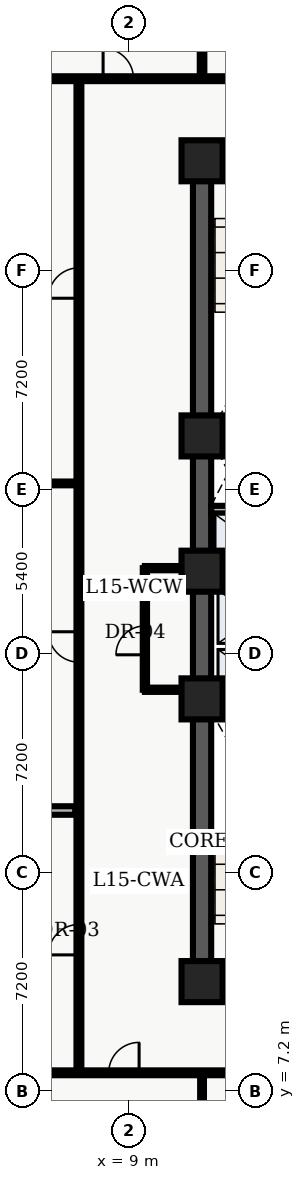
"""IFC4 building model, lengths in metres.
Left out: names, types, materials, properties, quantities, classifications, styles, units other than length and angle.
Written with IfcOpenShell. Run it as: python <this file> out.ifc"""

import sys

from ifc_helpers import new_model, entity, si_unit, converted_unit, direction, frame, origin_with_axes, origin_2d_with_axis, place, context, subcontext, project, spatial, polyline, rectangle, outline, extrude, element, fill, save


model = new_model("IFC4")
c1 = context("Model", 3, precision=1e-05, world=origin_with_axes(), true_north=direction((0.0, 1.0)))
c2 = subcontext(c1, "Body", "Model", "MODEL_VIEW")
j1 = project(units=[si_unit("LENGTHUNIT", "METRE"), converted_unit("PLANEANGLEUNIT", "DEGREE", entity("IfcPlaneAngleMeasure", 0.017), si_unit("PLANEANGLEUNIT", "RADIAN"), dimensions=[0, 0, 0, 0, 0, 0, 0])], contexts=[c1])
p1 = place(None, origin_with_axes())
s1 = spatial("IfcSite", under=j1, at=p1, CompositionType="ELEMENT")
p2 = place(p1, origin_with_axes())
s2 = spatial("IfcBuilding", under=s1, at=p2, CompositionType="ELEMENT")
p3 = place(p2, frame((0.0, 0.0, 63.9), z_axis=(0.0, 0.0, 1.0), x_axis=(1.0, 0.0, 0.0)))
s3 = spatial("IfcBuildingStorey", under=s2, at=p3, CompositionType="ELEMENT", Elevation=63.9)
p4 = place(p3, frame((11.4, 10.8, 0.0), z_axis=(0.0, 0.0, 1.0), x_axis=(0.0, 1.0, 0.0)))
e1 = element("IfcWall", 1, at=p4, inside=s3, PredefinedType="SHEAR", context=c2, shape_type="SweptSolid", body=[
    extrude(outline(polyline([(0.0, -0.3), (27.0, -0.3), (27.0, 0.3), (0.0, 0.3), (0.0, -0.3)])), origin_with_axes(), (0.0, 0.0, 1.0), 3.66),
])
p5 = place(p3, frame((11.4, 10.8, 0.0), z_axis=(0.0, 0.0, 1.0), x_axis=(1.0, 0.0, 0.0)))
e2 = element("IfcWall", 2, at=p5, inside=s3, PredefinedType="SHEAR", context=c2, shape_type="SweptSolid", body=[
    extrude(outline(polyline([(0.0, -0.3), (7.2, -0.3), (7.2, 0.3), (0.0, 0.3), (0.0, -0.3)])), origin_with_axes(), (0.0, 0.0, 1.0), 3.66),
])
p6 = place(p5, frame((2.625, 0.0, 0.0), z_axis=(0.0, 0.0, 1.0), x_axis=(1.0, 0.0, 0.0)))
e3 = element("IfcOpeningElement", 3, at=p6, cuts=e2, PredefinedType="OPENING", context=c2, shape_type="SweptSolid", body=[
    extrude(rectangle(XDim=1.05, YDim=0.62, at=origin_2d_with_axis()), origin_with_axes(), (0.0, 0.0, 1.0), 2.15),
])
p7 = place(p3, frame((11.4, 37.8, 0.0), z_axis=(0.0, 0.0, 1.0), x_axis=(1.0, 0.0, 0.0)))
e4 = element("IfcWall", 4, at=p7, inside=s3, PredefinedType="SHEAR", context=c2, shape_type="SweptSolid", body=[
    extrude(outline(polyline([(0.0, -0.3), (7.2, -0.3), (7.2, 0.3), (0.0, 0.3), (0.0, -0.3)])), origin_with_axes(), (0.0, 0.0, 1.0), 3.66),
])
p8 = place(p7, frame((2.625, 0.0, 0.0), z_axis=(0.0, 0.0, 1.0), x_axis=(1.0, 0.0, 0.0)))
e5 = element("IfcOpeningElement", 5, at=p8, cuts=e4, PredefinedType="OPENING", context=c2, shape_type="SweptSolid", body=[
    extrude(rectangle(XDim=1.05, YDim=0.62, at=origin_2d_with_axis()), origin_with_axes(), (0.0, 0.0, 1.0), 2.15),
])
for number, where, z_axis, x_axis in (
    (6, (11.7, 19.825, 0.0), (0.0, 0.0, 1.0), (1.0, 0.0, 0.0)),
    (7, (11.7, 28.775, 0.0), (0.0, 0.0, 1.0), (1.0, 0.0, 0.0)),
):
    element("IfcWall", number, at=place(p3, frame(where, z_axis=z_axis, x_axis=x_axis)), inside=s3, PredefinedType="SHEAR", context=c2, shape_type="SweptSolid", body=[
        extrude(outline(polyline([(0.0, -0.125), (6.6, -0.125), (6.6, 0.125), (0.0, 0.125), (0.0, -0.125)])), origin_with_axes(), (0.0, 0.0, 1.0), 3.66),
    ])
p9 = place(p3, frame((11.7, 24.1, 0.0), z_axis=(0.0, 0.0, 1.0), x_axis=(1.0, 0.0, 0.0)))
e8 = element("IfcWall", 8, at=p9, inside=s3, PredefinedType="SOLIDWALL", context=c2, shape_type="SweptSolid", body=[
    extrude(outline(polyline([(0.0, -0.125), (6.6, -0.125), (6.6, 0.125), (0.0, 0.125), (0.0, -0.125)])), origin_with_axes(), (0.0, 0.0, 1.0), 2.7),
])
p10 = place(p9, frame((3.75, 0.0, 0.0), z_axis=(0.0, 0.0, 1.0), x_axis=(1.0, 0.0, 0.0)))
e9 = element("IfcOpeningElement", 9, at=p10, cuts=e8, PredefinedType="OPENING", context=c2, shape_type="SweptSolid", body=[
    extrude(rectangle(XDim=0.9, YDim=0.27, at=origin_2d_with_axis()), origin_with_axes(), (0.0, 0.0, 1.0), 2.15),
])
p11 = place(p3, frame((11.7, 26.325, 0.0), z_axis=(0.0, 0.0, 1.0), x_axis=(1.0, 0.0, 0.0)))
e10 = element("IfcWall", 10, at=p11, inside=s3, PredefinedType="SOLIDWALL", context=c2, shape_type="SweptSolid", body=[
    extrude(outline(polyline([(0.0, -0.125), (6.6, -0.125), (6.6, 0.125), (0.0, 0.125), (0.0, -0.125)])), origin_with_axes(), (0.0, 0.0, 1.0), 2.7),
])
p12 = place(p11, frame((3.5, 0.0, 0.0), z_axis=(0.0, 0.0, 1.0), x_axis=(1.0, 0.0, 0.0)))
e11 = element("IfcOpeningElement", 11, at=p12, cuts=e10, PredefinedType="OPENING", context=c2, shape_type="SweptSolid", body=[
    extrude(rectangle(XDim=0.9, YDim=0.27, at=origin_2d_with_axis()), origin_with_axes(), (0.0, 0.0, 1.0), 2.15),
])
for number, where, z_axis, x_axis in (
    (12, (11.4, 10.8, 0.0), (0.0, 0.0, 1.0), (1.0, 0.0, 0.0)),
    (13, (11.4, 20.1, 0.0), (0.0, 0.0, 1.0), (1.0, 0.0, 0.0)),
    (14, (11.4, 24.3, 0.0), (0.0, 0.0, 1.0), (1.0, 0.0, 0.0)),
    (15, (11.4, 28.75, 0.0), (0.0, 0.0, 1.0), (1.0, 0.0, 0.0)),
    (16, (11.4, 37.8, 0.0), (0.0, 0.0, 1.0), (1.0, 0.0, 0.0)),
):
    element("IfcColumn", number, at=place(p3, frame(where, z_axis=z_axis, x_axis=x_axis)), inside=s3, PredefinedType="COLUMN", context=c2, shape_type="SweptSolid", body=[
        extrude(rectangle(XDim=1.35, YDim=1.35, at=origin_2d_with_axis()), origin_with_axes(), (0.0, 0.0, 1.0), 3.9),
    ])
p13 = place(p3, frame((9.52, 20.4, 0.0), z_axis=(0.0, 0.0, 1.0), x_axis=(0.0, 1.0, 0.0)))
e17 = element("IfcWall", 17, at=p13, inside=s3, PredefinedType="PARTITIONING", context=c2, shape_type="SweptSolid", body=[
    extrude(outline(polyline([(0.0, -0.07), (4.0, -0.07), (4.0, 0.07), (0.0, 0.07), (0.0, -0.07)])), origin_with_axes(), (0.0, 0.0, 1.0), 2.7),
])
p14 = place(p13, frame((1.625, 0.0, 0.0), z_axis=(0.0, 0.0, 1.0), x_axis=(1.0, 0.0, 0.0)))
e18 = element("IfcOpeningElement", 18, at=p14, cuts=e17, PredefinedType="OPENING", context=c2, shape_type="SweptSolid", body=[
    extrude(rectangle(XDim=0.95, YDim=0.16, at=origin_2d_with_axis()), origin_with_axes(), (0.0, 0.0, 1.0), 2.15),
])
for number, where, z_axis, x_axis in (
    (19, (9.52, 20.4, 0.0), (0.0, 0.0, 1.0), (1.0, 0.0, 0.0)),
    (20, (9.52, 24.4, 0.0), (0.0, 0.0, 1.0), (1.0, 0.0, 0.0)),
):
    element("IfcWall", number, at=place(p3, frame(where, z_axis=z_axis, x_axis=x_axis)), inside=s3, PredefinedType="PARTITIONING", context=c2, shape_type="SweptSolid", body=[
        extrude(outline(polyline([(0.0, -0.07), (1.58, -0.07), (1.58, 0.07), (0.0, 0.07), (0.0, -0.07)])), origin_with_axes(), (0.0, 0.0, 1.0), 2.7),
    ])
p15 = place(p3, frame((2.6, 7.8, 0.0), z_axis=(0.0, 0.0, 1.0), x_axis=(1.0, 0.0, 0.0)))
e21 = element("IfcWall", 21, at=p15, inside=s3, PredefinedType="PARTITIONING", context=c2, shape_type="SweptSolid", body=[
    extrude(outline(polyline([(0.0, -0.08), (18.55, -0.08), (18.55, 0.08), (0.0, 0.08), (0.0, -0.08)])), origin_with_axes(), (0.0, 0.0, 1.0), 2.7),
])
p16 = place(p15, frame((1.825, 0.0, 0.0), z_axis=(0.0, 0.0, 1.0), x_axis=(1.0, 0.0, 0.0)))
e22 = element("IfcOpeningElement", 22, at=p16, cuts=e21, PredefinedType="OPENING", context=c2, shape_type="SweptSolid", body=[
    extrude(rectangle(XDim=1.0, YDim=0.18, at=origin_2d_with_axis()), origin_with_axes(), (0.0, 0.0, 1.0), 2.15),
])
p17 = place(p15, frame((6.229, 0.0, 0.0), z_axis=(0.0, 0.0, 1.0), x_axis=(1.0, 0.0, 0.0)))
e23 = element("IfcOpeningElement", 23, at=p17, cuts=e21, PredefinedType="OPENING", context=c2, shape_type="SweptSolid", body=[
    extrude(rectangle(XDim=1.0, YDim=0.18, at=origin_2d_with_axis()), origin_with_axes(), (0.0, 0.0, 1.0), 2.15),
])
p18 = place(p15, frame((10.706, 0.0, 0.0), z_axis=(0.0, 0.0, 1.0), x_axis=(1.0, 0.0, 0.0)))
e24 = element("IfcOpeningElement", 24, at=p18, cuts=e21, PredefinedType="OPENING", context=c2, shape_type="SweptSolid", body=[
    extrude(rectangle(XDim=1.0, YDim=0.18, at=origin_2d_with_axis()), origin_with_axes(), (0.0, 0.0, 1.0), 2.15),
])
p19 = place(p15, frame((15.556, 0.0, 0.0), z_axis=(0.0, 0.0, 1.0), x_axis=(1.0, 0.0, 0.0)))
e25 = element("IfcOpeningElement", 25, at=p19, cuts=e21, PredefinedType="OPENING", context=c2, shape_type="SweptSolid", body=[
    extrude(rectangle(XDim=1.0, YDim=0.18, at=origin_2d_with_axis()), origin_with_axes(), (0.0, 0.0, 1.0), 2.15),
])
p20 = place(p3, frame((2.6, 40.5, 0.0), z_axis=(0.0, 0.0, 1.0), x_axis=(1.0, 0.0, 0.0)))
e26 = element("IfcWall", 26, at=p20, inside=s3, PredefinedType="PARTITIONING", context=c2, shape_type="SweptSolid", body=[
    extrude(outline(polyline([(0.0, -0.08), (18.65, -0.08), (18.65, 0.08), (0.0, 0.08), (0.0, -0.08)])), origin_with_axes(), (0.0, 0.0, 1.0), 2.7),
])
p21 = place(p20, frame((6.045, 0.0, 0.0), z_axis=(0.0, 0.0, 1.0), x_axis=(1.0, 0.0, 0.0)))
e27 = element("IfcOpeningElement", 27, at=p21, cuts=e26, PredefinedType="OPENING", context=c2, shape_type="SweptSolid", body=[
    extrude(rectangle(XDim=1.0, YDim=0.18, at=origin_2d_with_axis()), origin_with_axes(), (0.0, 0.0, 1.0), 2.15),
])
p22 = place(p20, frame((12.61, 0.0, 0.0), z_axis=(0.0, 0.0, 1.0), x_axis=(1.0, 0.0, 0.0)))
e28 = element("IfcOpeningElement", 28, at=p22, cuts=e26, PredefinedType="OPENING", context=c2, shape_type="SweptSolid", body=[
    extrude(rectangle(XDim=1.2, YDim=0.18, at=origin_2d_with_axis()), origin_with_axes(), (0.0, 0.0, 1.0), 2.2),
])
p23 = place(p3, frame((7.35, 7.8, 0.0), z_axis=(0.0, 0.0, 1.0), x_axis=(0.0, 1.0, 0.0)))
e29 = element("IfcWall", 29, at=p23, inside=s3, PredefinedType="PARTITIONING", context=c2, shape_type="SweptSolid", body=[
    extrude(outline(polyline([(0.0, -0.08), (32.7, -0.08), (32.7, 0.08), (0.0, 0.08), (0.0, -0.08)])), origin_with_axes(), (0.0, 0.0, 1.0), 2.7),
])
p24 = place(p23, frame((4.379, 0.0, 0.0), z_axis=(0.0, 0.0, 1.0), x_axis=(1.0, 0.0, 0.0)))
e30 = element("IfcOpeningElement", 30, at=p24, cuts=e29, PredefinedType="OPENING", context=c2, shape_type="SweptSolid", body=[
    extrude(rectangle(XDim=1.0, YDim=0.18, at=origin_2d_with_axis()), origin_with_axes(), (0.0, 0.0, 1.0), 2.15),
])
p25 = place(p23, frame((14.008, 0.0, 0.0), z_axis=(0.0, 0.0, 1.0), x_axis=(1.0, 0.0, 0.0)))
e31 = element("IfcOpeningElement", 31, at=p25, cuts=e29, PredefinedType="OPENING", context=c2, shape_type="SweptSolid", body=[
    extrude(rectangle(XDim=1.0, YDim=0.18, at=origin_2d_with_axis()), origin_with_axes(), (0.0, 0.0, 1.0), 2.15),
])
p26 = place(p23, frame((25.979, 0.0, 0.0), z_axis=(0.0, 0.0, 1.0), x_axis=(1.0, 0.0, 0.0)))
e32 = element("IfcOpeningElement", 32, at=p26, cuts=e29, PredefinedType="OPENING", context=c2, shape_type="SweptSolid", body=[
    extrude(rectangle(XDim=1.0, YDim=0.18, at=origin_2d_with_axis()), origin_with_axes(), (0.0, 0.0, 1.0), 2.15),
])
p27 = place(p3, frame((0.375, 16.428, 0.0), z_axis=(0.0, 0.0, 1.0), x_axis=(1.0, 0.0, 0.0)))
e33 = element("IfcWall", 33, at=p27, inside=s3, PredefinedType="PARTITIONING", context=c2, shape_type="SweptSolid", body=[
    extrude(outline(polyline([(0.0, -0.14), (6.855, -0.14), (6.855, 0.14), (0.0, 0.14), (0.0, -0.14)])), origin_with_axes(), (0.0, 0.0, 1.0), 2.7),
])
p28 = place(p3, frame((0.375, 27.187, 0.0), z_axis=(0.0, 0.0, 1.0), x_axis=(1.0, 0.0, 0.0)))
e34 = element("IfcWall", 34, at=p28, inside=s3, PredefinedType="PARTITIONING", context=c2, shape_type="SweptSolid", body=[
    extrude(outline(polyline([(0.0, -0.062), (6.855, -0.062), (6.855, 0.062), (0.0, 0.062), (0.0, -0.062)])), origin_with_axes(), (0.0, 0.0, 1.0), 2.7),
])
p29 = place(p3, frame((11.4, 0.36, 0.0), z_axis=(0.0, 0.0, 1.0), x_axis=(0.0, 1.0, 0.0)))
e35 = element("IfcWall", 35, at=p29, inside=s3, PredefinedType="PARTITIONING", context=c2, shape_type="SweptSolid", body=[
    extrude(outline(polyline([(0.0, -0.062), (7.34, -0.062), (7.34, 0.062), (0.0, 0.062), (0.0, -0.062)])), origin_with_axes(), (0.0, 0.0, 1.0), 2.7),
])
p30 = place(p3, frame((11.4, 40.6, 0.0), z_axis=(0.0, 0.0, 1.0), x_axis=(0.0, 1.0, 0.0)))
e36 = element("IfcWall", 36, at=p30, inside=s3, PredefinedType="PARTITIONING", context=c2, shape_type="SweptSolid", body=[
    extrude(outline(polyline([(0.0, -0.075), (7.64, -0.075), (7.64, 0.075), (0.0, 0.075), (0.0, -0.075)])), origin_with_axes(), (0.0, 0.0, 1.0), 2.7),
])
p31 = place(p13, frame((1.625, 0.0, 0.0), z_axis=(0.0, 0.0, 1.0), x_axis=(1.0, 0.0, 0.0)))
e37 = element("IfcDoor", 37, at=p31, inside=s3, OperationType="SINGLE_SWING_LEFT", PredefinedType="DOOR", context=c2, shape_type="SweptSolid", body=[
    extrude(rectangle(XDim=0.95, YDim=0.084, at=origin_2d_with_axis()), origin_with_axes(), (0.0, 0.0, 1.0), 2.15),
])
fill(e18, e37)
p32 = place(p23, frame((4.379, 0.0, 0.0), z_axis=(0.0, 0.0, 1.0), x_axis=(1.0, 0.0, 0.0)))
e38 = element("IfcDoor", 38, at=p32, inside=s3, OperationType="SINGLE_SWING_LEFT", PredefinedType="DOOR", context=c2, shape_type="SweptSolid", body=[
    extrude(rectangle(XDim=1.0, YDim=0.09, at=origin_2d_with_axis()), origin_with_axes(), (0.0, 0.0, 1.0), 2.15),
])
fill(e30, e38)
p33 = place(p23, frame((14.008, 0.0, 0.0), z_axis=(0.0, 0.0, 1.0), x_axis=(1.0, 0.0, 0.0)))
e39 = element("IfcDoor", 39, at=p33, inside=s3, OperationType="SINGLE_SWING_RIGHT", PredefinedType="DOOR", context=c2, shape_type="SweptSolid", body=[
    extrude(rectangle(XDim=1.0, YDim=0.09, at=origin_2d_with_axis()), origin_with_axes(), (0.0, 0.0, 1.0), 2.15),
])
fill(e31, e39)
p34 = place(p23, frame((25.979, 0.0, 0.0), z_axis=(0.0, 0.0, 1.0), x_axis=(1.0, 0.0, 0.0)))
e40 = element("IfcDoor", 40, at=p34, inside=s3, OperationType="SINGLE_SWING_LEFT", PredefinedType="DOOR", context=c2, shape_type="SweptSolid", body=[
    extrude(rectangle(XDim=1.0, YDim=0.09, at=origin_2d_with_axis()), origin_with_axes(), (0.0, 0.0, 1.0), 2.15),
])
fill(e32, e40)
p35 = place(p15, frame((6.229, 0.0, 0.0), z_axis=(0.0, 0.0, 1.0), x_axis=(1.0, 0.0, 0.0)))
e41 = element("IfcDoor", 41, at=p35, inside=s3, OperationType="SINGLE_SWING_RIGHT", PredefinedType="DOOR", context=c2, shape_type="SweptSolid", body=[
    extrude(rectangle(XDim=1.0, YDim=0.09, at=origin_2d_with_axis()), origin_with_axes(), (0.0, 0.0, 1.0), 2.15),
])
fill(e23, e41)
p36 = place(p20, frame((6.045, 0.0, 0.0), z_axis=(0.0, 0.0, 1.0), x_axis=(1.0, 0.0, 0.0)))
e42 = element("IfcDoor", 42, at=p36, inside=s3, OperationType="SINGLE_SWING_LEFT", PredefinedType="DOOR", context=c2, shape_type="SweptSolid", body=[
    extrude(rectangle(XDim=1.0, YDim=0.09, at=origin_2d_with_axis()), origin_with_axes(), (0.0, 0.0, 1.0), 2.15),
])
fill(e27, e42)
save(model, sys.argv[1])
